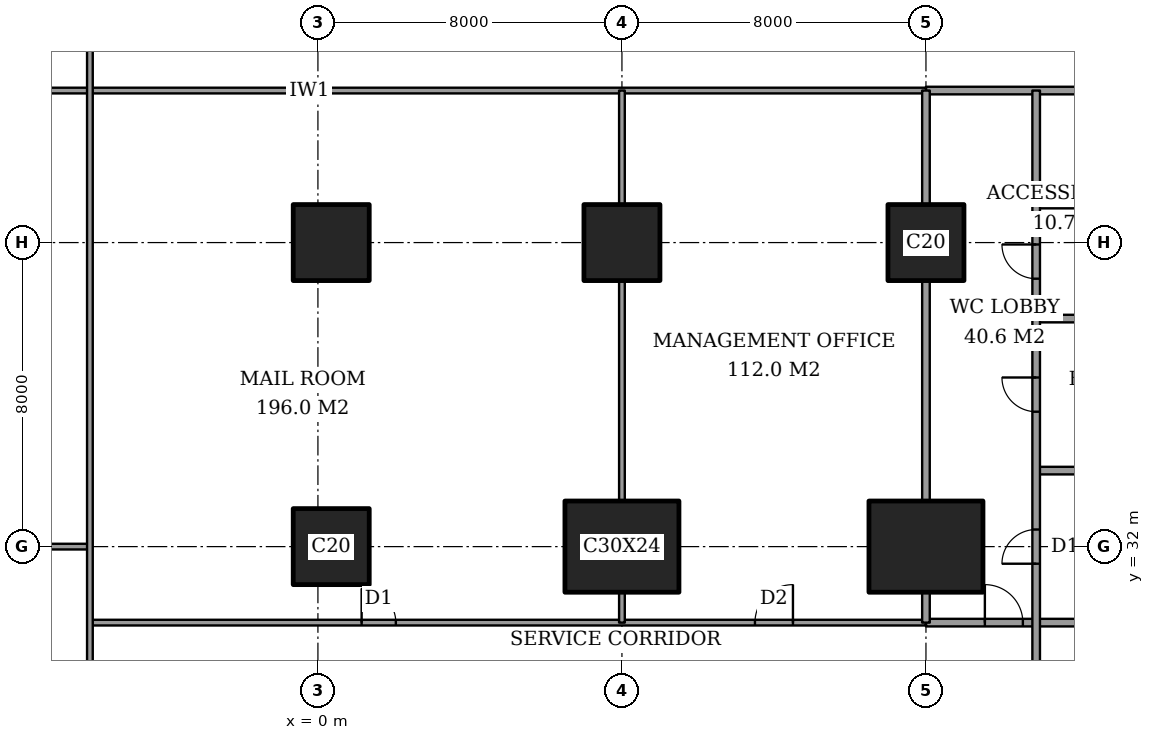
"""IFC4 building model, lengths in metres.
Left out: names, types, materials, properties, quantities, classifications, styles, units other than length and angle.
Written with IfcOpenShell. Run it as: python <this file> out.ifc"""

import sys

from ifc_helpers import new_model, si_unit, direction, frame, frame_2d, origin, origin_2d, place, context, subcontext, project, spatial, rectangle, extrude, element, fill, save


model = new_model("IFC4")
c1 = context("Model", 3, precision=1e-05, world=origin(), true_north=direction((0.0, 1.0)))
c2 = subcontext(c1, "Body", "Model", "MODEL_VIEW")
j1 = project(units=[si_unit("LENGTHUNIT", "METRE"), si_unit("PLANEANGLEUNIT", "RADIAN")], contexts=[c1])
p1 = place(None, origin())
s1 = spatial("IfcSite", under=j1, at=p1, CompositionType="ELEMENT")
p2 = place(p1, origin())
s2 = spatial("IfcBuilding", under=s1, at=p2, CompositionType="ELEMENT")
p3 = place(p2, origin())
s3 = spatial("IfcBuildingStorey", under=s2, at=p3, CompositionType="ELEMENT", Elevation=0.0)
for number, where, z_axis, x_axis in (
    (1, (0.35, 32.0, 0.0), (0.0, 0.0, 1.0), (1.0, 0.0, 0.0)),
    (2, (0.35, 40.0, 0.0), (0.0, 0.0, 1.0), (1.0, 0.0, 0.0)),
):
    element("IfcColumn", number, at=place(p3, frame(where, z_axis=z_axis, x_axis=x_axis)), inside=s3, PredefinedType="COLUMN", context=c2, shape_type="SweptSolid", body=[
        extrude(rectangle(XDim=2.0, YDim=2.0, at=origin_2d()), origin(), (0.0, 0.0, 1.0), 6.0),
    ])
p4 = place(p3, frame((8.0, 32.0, 0.0), z_axis=(0.0, 0.0, 1.0), x_axis=(1.0, 0.0, 0.0)))
e3 = element("IfcColumn", 3, at=p4, inside=s3, PredefinedType="COLUMN", context=c2, shape_type="SweptSolid", body=[
    extrude(rectangle(XDim=3.0, YDim=2.4, at=origin_2d()), origin(), (0.0, 0.0, 1.0), 6.0),
])
p5 = place(p3, frame((8.0, 40.0, 0.0), z_axis=(0.0, 0.0, 1.0), x_axis=(1.0, 0.0, 0.0)))
e4 = element("IfcColumn", 4, at=p5, inside=s3, PredefinedType="COLUMN", context=c2, shape_type="SweptSolid", body=[
    extrude(rectangle(XDim=2.0, YDim=2.0, at=origin_2d()), origin(), (0.0, 0.0, 1.0), 6.0),
])
p6 = place(p3, frame((16.0, 32.0, 0.0), z_axis=(0.0, 0.0, 1.0), x_axis=(1.0, 0.0, 0.0)))
e5 = element("IfcColumn", 5, at=p6, inside=s3, PredefinedType="COLUMN", context=c2, shape_type="SweptSolid", body=[
    extrude(rectangle(XDim=3.0, YDim=2.4, at=origin_2d()), origin(), (0.0, 0.0, 1.0), 6.0),
])
p7 = place(p3, frame((16.0, 40.0, 0.0), z_axis=(0.0, 0.0, 1.0), x_axis=(1.0, 0.0, 0.0)))
e6 = element("IfcColumn", 6, at=p7, inside=s3, PredefinedType="COLUMN", context=c2, shape_type="SweptSolid", body=[
    extrude(rectangle(XDim=2.0, YDim=2.0, at=origin_2d()), origin(), (0.0, 0.0, 1.0), 6.0),
])
p8 = place(p3, frame((16.0, 30.0, 0.0), z_axis=(0.0, 0.0, 1.0), x_axis=(1.0, 0.0, 0.0)))
e7 = element("IfcWall", 7, at=p8, inside=s3, PredefinedType="PARTITIONING", context=c2, shape_type="SweptSolid", body=[
    extrude(rectangle(XDim=8.0, YDim=0.2, at=frame_2d((4.0, 0.0))), origin(), (0.0, 0.0, 1.0), 5.7),
])
p9 = place(p8, frame((1.55, 0.0, 0.0)))
e8 = element("IfcOpeningElement", 8, at=p9, cuts=e7, PredefinedType="OPENING", context=c2, shape_type="SweptSolid", body=[
    extrude(rectangle(XDim=1.0, YDim=2.1, at=frame_2d((0.5, 1.05))), frame((0.0, 0.11, 0.0), z_axis=(0.0, -1.0, 0.0), x_axis=(1.0, 0.0, 0.0)), (0.0, 0.0, 1.0), 0.22),
])
p10 = place(p3, frame((-6.0, 30.0, 0.0), z_axis=(0.0, 0.0, 1.0), x_axis=(1.0, 0.0, 0.0)))
e9 = element("IfcWall", 9, at=p10, inside=s3, PredefinedType="PARTITIONING", context=c2, shape_type="SweptSolid", body=[
    extrude(rectangle(XDim=22.0, YDim=0.15, at=frame_2d((11.0, 0.0))), origin(), (0.0, 0.0, 1.0), 5.7),
])
p11 = place(p10, frame((7.15, 0.0, 0.0)))
e10 = element("IfcOpeningElement", 10, at=p11, cuts=e9, PredefinedType="OPENING", context=c2, shape_type="SweptSolid", body=[
    extrude(rectangle(XDim=0.9, YDim=2.1, at=frame_2d((0.45, 1.05))), frame((0.0, 0.085, 0.0), z_axis=(0.0, -1.0, 0.0), x_axis=(1.0, 0.0, 0.0)), (0.0, 0.0, 1.0), 0.17),
])
p12 = place(p10, frame((17.5, 0.0, 0.0)))
e11 = element("IfcOpeningElement", 11, at=p12, cuts=e9, PredefinedType="OPENING", context=c2, shape_type="SweptSolid", body=[
    extrude(rectangle(XDim=1.0, YDim=2.1, at=frame_2d((0.5, 1.05))), frame((0.0, 0.085, 0.0), z_axis=(0.0, -1.0, 0.0), x_axis=(1.0, 0.0, 0.0)), (0.0, 0.0, 1.0), 0.17),
])
p13 = place(p3, frame((-7.45, 32.0, 0.0), z_axis=(0.0, 0.0, 1.0), x_axis=(1.0, 0.0, 0.0)))
e12 = element("IfcWall", 12, at=p13, inside=s3, PredefinedType="PARTITIONING", context=c2, shape_type="SweptSolid", body=[
    extrude(rectangle(XDim=1.45, YDim=0.15, at=frame_2d((0.725, 0.0))), origin(), (0.0, 0.0, 1.0), 4.3),
])
for number, where, z_axis, x_axis in (
    (13, (18.9, 34.0, 0.0), (0.0, 0.0, 1.0), (1.0, 0.0, 0.0)),
    (14, (18.9, 38.0, 0.0), (0.0, 0.0, 1.0), (1.0, 0.0, 0.0)),
):
    element("IfcWall", number, at=place(p3, frame(where, z_axis=z_axis, x_axis=x_axis)), inside=s3, PredefinedType="PARTITIONING", context=c2, shape_type="SweptSolid", body=[
        extrude(rectangle(XDim=5.1, YDim=0.2, at=frame_2d((2.55, 0.0))), origin(), (0.0, 0.0, 1.0), 5.7),
    ])
p14 = place(p3, frame((18.9, 41.0, 0.0), z_axis=(0.0, 0.0, 1.0), x_axis=(1.0, 0.0, 0.0)))
e15 = element("IfcWall", 15, at=p14, inside=s3, PredefinedType="PARTITIONING", context=c2, shape_type="SweptSolid", body=[
    extrude(rectangle(XDim=3.55, YDim=0.2, at=frame_2d((1.775, 0.0))), origin(), (0.0, 0.0, 1.0), 5.7),
])
p15 = place(p3, frame((16.0, 44.0, 0.0), z_axis=(0.0, 0.0, 1.0), x_axis=(1.0, 0.0, 0.0)))
e16 = element("IfcWall", 16, at=p15, inside=s3, PredefinedType="PARTITIONING", context=c2, shape_type="SweptSolid", body=[
    extrude(rectangle(XDim=8.45, YDim=0.2, at=frame_2d((4.225, 0.0))), origin(), (0.0, 0.0, 1.0), 5.7),
])
p16 = place(p3, frame((-16.45, 44.0, 0.0), z_axis=(0.0, 0.0, 1.0), x_axis=(1.0, 0.0, 0.0)))
e17 = element("IfcWall", 17, at=p16, inside=s3, PredefinedType="PARTITIONING", context=c2, shape_type="SweptSolid", body=[
    extrude(rectangle(XDim=32.45, YDim=0.15, at=frame_2d((16.225, 0.0))), origin(), (0.0, 0.0, 1.0), 5.7),
])
p17 = place(p3, frame((-6.0, 24.0, 0.0), z_axis=(0.0, 0.0, 1.0), x_axis=(0.0, 1.0, 0.0)))
e18 = element("IfcWall", 18, at=p17, inside=s3, PredefinedType="PARTITIONING", context=c2, shape_type="SweptSolid", body=[
    extrude(rectangle(XDim=24.25, YDim=0.15, at=frame_2d((12.125, 0.0))), origin(), (0.0, 0.0, 1.0), 5.7),
])
p18 = place(p17, frame((21.675, 0.0, 0.0)))
e19 = element("IfcOpeningElement", 19, at=p18, cuts=e18, PredefinedType="OPENING", context=c2, shape_type="SweptSolid", body=[
    extrude(rectangle(XDim=0.9, YDim=2.1, at=frame_2d((0.45, 1.05))), frame((0.0, 0.085, 0.0), z_axis=(0.0, -1.0, 0.0), x_axis=(1.0, 0.0, 0.0)), (0.0, 0.0, 1.0), 0.17),
])
p19 = place(p3, frame((8.0, 30.0, 0.0), z_axis=(0.0, 0.0, 1.0), x_axis=(0.0, 1.0, 0.0)))
e20 = element("IfcWall", 20, at=p19, inside=s3, PredefinedType="PARTITIONING", context=c2, shape_type="SweptSolid", body=[
    extrude(rectangle(XDim=0.8, YDim=0.15, at=frame_2d((0.4, 0.0))), origin(), (0.0, 0.0, 1.0), 4.3),
])
p20 = place(p3, frame((8.0, 33.2, 0.0), z_axis=(0.0, 0.0, 1.0), x_axis=(0.0, 1.0, 0.0)))
e21 = element("IfcWall", 21, at=p20, inside=s3, PredefinedType="PARTITIONING", context=c2, shape_type="SweptSolid", body=[
    extrude(rectangle(XDim=5.8, YDim=0.15, at=frame_2d((2.9, 0.0))), origin(), (0.0, 0.0, 1.0), 4.3),
])
p21 = place(p3, frame((8.0, 41.0, 0.0), z_axis=(0.0, 0.0, 1.0), x_axis=(0.0, 1.0, 0.0)))
e22 = element("IfcWall", 22, at=p21, inside=s3, PredefinedType="PARTITIONING", context=c2, shape_type="SweptSolid", body=[
    extrude(rectangle(XDim=3.0, YDim=0.15, at=frame_2d((1.5, 0.0))), origin(), (0.0, 0.0, 1.0), 4.3),
])
p22 = place(p3, frame((16.0, 30.0, 0.0), z_axis=(0.0, 0.0, 1.0), x_axis=(0.0, 1.0, 0.0)))
e23 = element("IfcWall", 23, at=p22, inside=s3, PredefinedType="PARTITIONING", context=c2, shape_type="SweptSolid", body=[
    extrude(rectangle(XDim=0.8, YDim=0.2, at=frame_2d((0.4, 0.0))), origin(), (0.0, 0.0, 1.0), 4.3),
])
p23 = place(p3, frame((16.0, 33.2, 0.0), z_axis=(0.0, 0.0, 1.0), x_axis=(0.0, 1.0, 0.0)))
e24 = element("IfcWall", 24, at=p23, inside=s3, PredefinedType="PARTITIONING", context=c2, shape_type="SweptSolid", body=[
    extrude(rectangle(XDim=5.8, YDim=0.2, at=frame_2d((2.9, 0.0))), origin(), (0.0, 0.0, 1.0), 4.3),
])
p24 = place(p3, frame((16.0, 41.0, 0.0), z_axis=(0.0, 0.0, 1.0), x_axis=(0.0, 1.0, 0.0)))
e25 = element("IfcWall", 25, at=p24, inside=s3, PredefinedType="PARTITIONING", context=c2, shape_type="SweptSolid", body=[
    extrude(rectangle(XDim=3.0, YDim=0.2, at=frame_2d((1.5, 0.0))), origin(), (0.0, 0.0, 1.0), 4.3),
])
p25 = place(p3, frame((18.9, 28.0, 0.0), z_axis=(0.0, 0.0, 1.0), x_axis=(0.0, 1.0, 0.0)))
e26 = element("IfcWall", 26, at=p25, inside=s3, PredefinedType="PARTITIONING", context=c2, shape_type="SweptSolid", body=[
    extrude(rectangle(XDim=16.0, YDim=0.2, at=frame_2d((8.0, 0.0))), origin(), (0.0, 0.0, 1.0), 5.7),
])
p26 = place(p25, frame((3.55, 0.0, 0.0)))
e27 = element("IfcOpeningElement", 27, at=p26, cuts=e26, PredefinedType="OPENING", context=c2, shape_type="SweptSolid", body=[
    extrude(rectangle(XDim=0.9, YDim=2.1, at=frame_2d((0.45, 1.05))), frame((0.0, 0.11, 0.0), z_axis=(0.0, -1.0, 0.0), x_axis=(1.0, 0.0, 0.0)), (0.0, 0.0, 1.0), 0.22),
])
p27 = place(p25, frame((7.55, 0.0, 0.0)))
e28 = element("IfcOpeningElement", 28, at=p27, cuts=e26, PredefinedType="OPENING", context=c2, shape_type="SweptSolid", body=[
    extrude(rectangle(XDim=0.9, YDim=2.1, at=frame_2d((0.45, 1.05))), frame((0.0, 0.11, 0.0), z_axis=(0.0, -1.0, 0.0), x_axis=(1.0, 0.0, 0.0)), (0.0, 0.0, 1.0), 0.22),
])
p28 = place(p25, frame((11.05, 0.0, 0.0)))
e29 = element("IfcOpeningElement", 29, at=p28, cuts=e26, PredefinedType="OPENING", context=c2, shape_type="SweptSolid", body=[
    extrude(rectangle(XDim=0.9, YDim=2.1, at=frame_2d((0.45, 1.05))), frame((0.0, 0.11, 0.0), z_axis=(0.0, -1.0, 0.0), x_axis=(1.0, 0.0, 0.0)), (0.0, 0.0, 1.0), 0.22),
])
p29 = place(p11, origin())
e30 = element("IfcDoor", 30, at=p29, inside=s3, OperationType="SINGLE_SWING_RIGHT", PredefinedType="DOOR", context=c2, shape_type="SweptSolid", body=[
    extrude(rectangle(XDim=0.9, YDim=2.1, at=frame_2d((0.45, 1.05))), frame((0.0, 0.025, 0.0), z_axis=(0.0, -1.0, 0.0), x_axis=(1.0, 0.0, 0.0)), (0.0, 0.0, 1.0), 0.05),
])
fill(e10, e30)
p30 = place(p12, origin())
e31 = element("IfcDoor", 31, at=p30, inside=s3, OperationType="SINGLE_SWING_LEFT", PredefinedType="DOOR", context=c2, shape_type="SweptSolid", body=[
    extrude(rectangle(XDim=1.0, YDim=2.1, at=frame_2d((0.5, 1.05))), frame((0.0, 0.025, 0.0), z_axis=(0.0, -1.0, 0.0), x_axis=(1.0, 0.0, 0.0)), (0.0, 0.0, 1.0), 0.05),
])
fill(e11, e31)
p31 = place(p26, origin())
e32 = element("IfcDoor", 32, at=p31, inside=s3, OperationType="SINGLE_SWING_RIGHT", PredefinedType="DOOR", context=c2, shape_type="SweptSolid", body=[
    extrude(rectangle(XDim=0.9, YDim=2.1, at=frame_2d((0.45, 1.05))), frame((0.0, 0.025, 0.0), z_axis=(0.0, -1.0, 0.0), x_axis=(1.0, 0.0, 0.0)), (0.0, 0.0, 1.0), 0.05),
])
fill(e27, e32)
p32 = place(p27, origin())
e33 = element("IfcDoor", 33, at=p32, inside=s3, OperationType="SINGLE_SWING_LEFT", PredefinedType="DOOR", context=c2, shape_type="SweptSolid", body=[
    extrude(rectangle(XDim=0.9, YDim=2.1, at=frame_2d((0.45, 1.05))), frame((0.0, 0.025, 0.0), z_axis=(0.0, -1.0, 0.0), x_axis=(1.0, 0.0, 0.0)), (0.0, 0.0, 1.0), 0.05),
])
fill(e28, e33)
p33 = place(p28, origin())
e34 = element("IfcDoor", 34, at=p33, inside=s3, OperationType="SINGLE_SWING_LEFT", PredefinedType="DOOR", context=c2, shape_type="SweptSolid", body=[
    extrude(rectangle(XDim=0.9, YDim=2.1, at=frame_2d((0.45, 1.05))), frame((0.0, 0.025, 0.0), z_axis=(0.0, -1.0, 0.0), x_axis=(1.0, 0.0, 0.0)), (0.0, 0.0, 1.0), 0.05),
])
fill(e29, e34)
p34 = place(p9, origin())
e35 = element("IfcDoor", 35, at=p34, inside=s3, OperationType="SINGLE_SWING_RIGHT", PredefinedType="DOOR", context=c2, shape_type="SweptSolid", body=[
    extrude(rectangle(XDim=1.0, YDim=2.1, at=frame_2d((0.5, 1.05))), frame((0.0, 0.025, 0.0), z_axis=(0.0, -1.0, 0.0), x_axis=(1.0, 0.0, 0.0)), (0.0, 0.0, 1.0), 0.05),
])
fill(e8, e35)
save(model, sys.argv[1])
